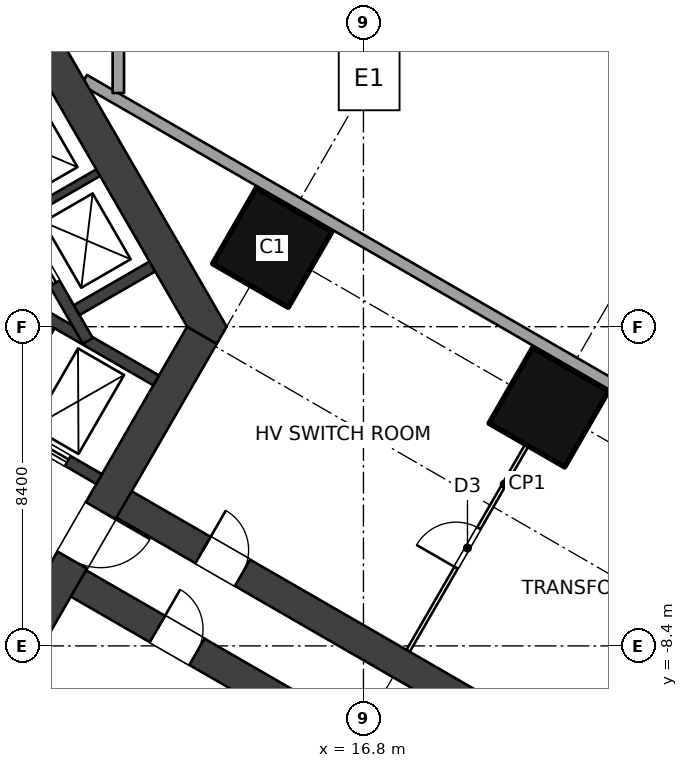
"""IFC4 building model, lengths in metres.
Left out: names, types, materials, properties, quantities, classifications, styles, units other than length and angle.
Written with IfcOpenShell. Run it as: python <this file> out.ifc"""

import sys

from ifc_helpers import new_model, si_unit, direction, frame, frame_2d, origin, origin_2d, place, context, subcontext, project, spatial, polyline, rectangle, outline, extrude, element, fill, save


model = new_model("IFC4")
c1 = context("Model", 3, precision=1e-05, world=origin(), true_north=direction((0.0, 1.0)))
c2 = subcontext(c1, "Body", "Model", "MODEL_VIEW")
j1 = project(units=[si_unit("LENGTHUNIT", "METRE"), si_unit("PLANEANGLEUNIT", "RADIAN")], contexts=[c1])
p1 = place(None, origin())
s1 = spatial("IfcSite", under=j1, at=p1, CompositionType="ELEMENT")
p2 = place(p1, origin())
s2 = spatial("IfcBuilding", under=s1, at=p2, CompositionType="ELEMENT")
p3 = place(p2, origin())
s3 = spatial("IfcBuildingStorey", under=s2, at=p3, CompositionType="ELEMENT", Elevation=0.0)
for number, where, z_axis, x_axis in (
    (1, (14.4, 2.078, 0.0), (0.0, 0.0, 1.0), (-0.5, -0.866, 0.0)),
    (2, (21.675, -2.122, 0.0), (0.0, 0.0, 1.0), (-0.5, -0.866, 0.0)),
):
    element("IfcColumn", number, at=place(p3, frame(where, z_axis=z_axis, x_axis=x_axis)), inside=s3, PredefinedType="COLUMN", context=c2, shape_type="SweptSolid", body=[
        extrude(rectangle(XDim=2.3, YDim=2.3, at=origin_2d()), origin(), (0.0, 0.0, 1.0), 6.0),
    ])
p4 = place(p3, frame((12.551, -0.225, 0.0), z_axis=(0.0, 0.0, 1.0), x_axis=(-0.499997612506, -0.8660267822, 0.0)))
e3 = element("IfcWall", 3, at=p4, inside=s3, PredefinedType="SHEAR", context=c2, shape_type="SweptSolid", body=[
    extrude(rectangle(XDim=12.161, YDim=0.9, at=frame_2d((6.08, 0.0))), origin(), (0.0, 0.0, 1.0), 6.0),
])
p5 = place(p4, frame((5.33, 0.0, 0.0)))
e4 = element("IfcOpeningElement", 4, at=p5, cuts=e3, PredefinedType="OPENING", context=c2, shape_type="SweptSolid", body=[
    extrude(rectangle(XDim=1.5, YDim=2.1, at=frame_2d((0.75, 1.05))), frame((0.0, 0.46, 0.0), z_axis=(0.0, -1.0, 0.0), x_axis=(1.0, 0.0, 0.0)), (0.0, 0.0, 1.0), 0.92),
])
p6 = place(p3, origin())
e5 = element("IfcWall", 5, at=p6, inside=s3, PredefinedType="SHEAR", context=c2, shape_type="SweptSolid", body=[
    extrude(outline(polyline([(13.2, 0.0), (6.6, 11.432), (6.08, 11.432), (6.08, 10.531), (12.161, 0.0), (12.94, -0.45), (13.2, 0.0)])), origin(), (0.0, 0.0, 1.0), 6.0),
])
p7 = place(p3, frame((3.869, -0.559, 0.0), z_axis=(0.0, 0.0, 1.0), x_axis=(0.86602711848, -0.499997030048, 0.0)))
e6 = element("IfcWall", 6, at=p7, inside=s3, PredefinedType="SHEAR", context=c2, shape_type="SweptSolid", body=[
    extrude(rectangle(XDim=6.901, YDim=0.3, at=frame_2d((3.451, 0.0))), origin(), (0.0, 0.0, 1.0), 6.0),
])
p8 = place(p7, frame((4.85, 0.0, 0.0)))
e7 = element("IfcOpeningElement", 7, at=p8, cuts=e6, PredefinedType="OPENING", context=c2, shape_type="SweptSolid", body=[
    extrude(rectangle(XDim=1.1, YDim=2.1, at=frame_2d((0.55, 1.05))), frame((0.0, 0.16, 0.0), z_axis=(0.0, -1.0, 0.0), x_axis=(1.0, 0.0, 0.0)), (0.0, 0.0, 1.0), 0.32),
])
p9 = place(p3, frame((5.369, 2.039, 0.0), z_axis=(0.0, 0.0, 1.0), x_axis=(0.86602711848, -0.499997030048, 0.0)))
e8 = element("IfcWall", 8, at=p9, inside=s3, PredefinedType="SHEAR", context=c2, shape_type="SweptSolid", body=[
    extrude(rectangle(XDim=6.901, YDim=0.3, at=frame_2d((3.451, 0.0))), origin(), (0.0, 0.0, 1.0), 6.0),
])
p10 = place(p3, frame((8.541, 0.034, 0.0), z_axis=(0.0, 0.0, 1.0), x_axis=(-0.50000943426, -0.866019956843, 0.0)))
e9 = element("IfcWall", 9, at=p10, inside=s3, PredefinedType="SHEAR", context=c2, shape_type="SweptSolid", body=[
    extrude(rectangle(XDim=2.7, YDim=0.3, at=frame_2d((1.35, 0.0))), origin(), (0.0, 0.0, 1.0), 6.0),
])
p11 = place(p3, frame((4.45, 8.455, 0.0), z_axis=(0.0, 0.0, 1.0), x_axis=(0.500002290144, -0.866024081565, 0.0)))
e10 = element("IfcWall", 10, at=p11, inside=s3, PredefinedType="SHEAR", context=c2, shape_type="SweptSolid", body=[
    extrude(rectangle(XDim=10.195, YDim=0.3, at=frame_2d((5.098, 0.0))), origin(), (0.0, 0.0, 1.0), 6.0),
])
p12 = place(p11, frame((1.748, 0.0, 0.0)))
e11 = element("IfcOpeningElement", 11, at=p12, cuts=e10, PredefinedType="OPENING", context=c2, shape_type="SweptSolid", body=[
    extrude(rectangle(XDim=1.1, YDim=2.1, at=frame_2d((0.55, 1.05))), frame((0.0, 0.16, 0.0), z_axis=(0.0, -1.0, 0.0), x_axis=(1.0, 0.0, 0.0)), (0.0, 0.0, 1.0), 0.32),
])
p13 = place(p11, frame((4.548, 0.0, 0.0)))
e12 = element("IfcOpeningElement", 12, at=p13, cuts=e10, PredefinedType="OPENING", context=c2, shape_type="SweptSolid", body=[
    extrude(rectangle(XDim=1.1, YDim=2.1, at=frame_2d((0.55, 1.05))), frame((0.0, 0.16, 0.0), z_axis=(0.0, -1.0, 0.0), x_axis=(1.0, 0.0, 0.0)), (0.0, 0.0, 1.0), 0.32),
])
p14 = place(p11, frame((7.348, 0.0, 0.0)))
e13 = element("IfcOpeningElement", 13, at=p14, cuts=e10, PredefinedType="OPENING", context=c2, shape_type="SweptSolid", body=[
    extrude(rectangle(XDim=1.1, YDim=2.1, at=frame_2d((0.55, 1.05))), frame((0.0, 0.16, 0.0), z_axis=(0.0, -1.0, 0.0), x_axis=(1.0, 0.0, 0.0)), (0.0, 0.0, 1.0), 0.32),
])
p15 = place(p3, frame((9.254, 0.435, 0.0), z_axis=(0.0, 0.0, 1.0), x_axis=(0.866007057882, 0.500031774688, 0.0)))
e14 = element("IfcWall", 14, at=p15, inside=s3, PredefinedType="SHEAR", context=c2, shape_type="SweptSolid", body=[
    extrude(rectangle(XDim=2.3, YDim=0.3, at=frame_2d((1.15, 0.0))), origin(), (0.0, 0.0, 1.0), 6.0),
])
p16 = place(p3, frame((7.829, 2.903, 0.0), z_axis=(0.0, 0.0, 1.0), x_axis=(0.866053019151, 0.499952165731, 0.0)))
e15 = element("IfcWall", 15, at=p16, inside=s3, PredefinedType="SHEAR", context=c2, shape_type="SweptSolid", body=[
    extrude(rectangle(XDim=2.3, YDim=0.2, at=frame_2d((1.15, 0.0))), origin(), (0.0, 0.0, 1.0), 6.0),
])
p17 = place(p3, frame((10.11, -4.451, 0.0), z_axis=(0.0, 0.0, 1.0), x_axis=(0.866025284237, -0.500000207062, 0.0)))
e16 = element("IfcWall", 16, at=p17, inside=s3, PredefinedType="SHEAR", context=c2, shape_type="SweptSolid", body=[
    extrude(rectangle(XDim=36.75, YDim=0.8, at=frame_2d((18.375, 0.0))), origin(), (0.0, 0.0, 1.0), 6.0),
])
p18 = place(p17, frame((2.85, 0.0, 0.0)))
e17 = element("IfcOpeningElement", 17, at=p18, cuts=e16, PredefinedType="OPENING", context=c2, shape_type="SweptSolid", body=[
    extrude(rectangle(XDim=1.2, YDim=2.1, at=frame_2d((0.6, 1.05))), frame((0.0, 0.41, 0.0), z_axis=(0.0, -1.0, 0.0), x_axis=(1.0, 0.0, 0.0)), (0.0, 0.0, 1.0), 0.82),
])
p19 = place(p3, frame((8.91, -6.53, 0.0), z_axis=(0.0, 0.0, 1.0), x_axis=(0.866025284237, -0.500000207062, 0.0)))
e18 = element("IfcWall", 18, at=p19, inside=s3, PredefinedType="SHEAR", context=c2, shape_type="SweptSolid", body=[
    extrude(rectangle(XDim=36.75, YDim=0.8, at=frame_2d((18.375, 0.0))), origin(), (0.0, 0.0, 1.0), 6.0),
])
p20 = place(p19, frame((10.0, 0.0, 0.0)))
e19 = element("IfcOpeningElement", 19, at=p20, cuts=e18, PredefinedType="OPENING", context=c2, shape_type="SweptSolid", body=[
    extrude(rectangle(XDim=1.0, YDim=2.1, at=frame_2d((0.5, 1.05))), frame((0.0, 0.41, 0.0), z_axis=(0.0, -1.0, 0.0), x_axis=(1.0, 0.0, 0.0)), (0.0, 0.0, 1.0), 0.82),
])
p21 = place(p19, frame((2.85, 0.0, 0.0)))
e20 = element("IfcOpeningElement", 20, at=p21, cuts=e18, PredefinedType="OPENING", context=c2, shape_type="SweptSolid", body=[
    extrude(rectangle(XDim=1.2, YDim=2.1, at=frame_2d((0.6, 1.05))), frame((0.0, 0.41, 0.0), z_axis=(0.0, -1.0, 0.0), x_axis=(1.0, 0.0, 0.0)), (0.0, 0.0, 1.0), 0.82),
])
p22 = place(p3, frame((17.975, -8.53, 0.0), z_axis=(0.0, 0.0, 1.0), x_axis=(0.500004234368, 0.866022959057, 0.0)))
e21 = element("IfcWall", 21, at=p22, inside=s3, PredefinedType="PARTITIONING", context=c2, shape_type="SweptSolid", body=[
    extrude(rectangle(XDim=6.25, YDim=0.1, at=frame_2d((3.125, 0.0))), origin(), (0.0, 0.0, 1.0), 3.9),
])
p23 = place(p22, frame((2.525, 0.0, 0.0)))
e22 = element("IfcOpeningElement", 22, at=p23, cuts=e21, PredefinedType="OPENING", context=c2, shape_type="SweptSolid", body=[
    extrude(rectangle(XDim=1.2, YDim=2.1, at=frame_2d((0.6, 1.05))), frame((0.0, 0.06, 0.0), z_axis=(0.0, -1.0, 0.0), x_axis=(1.0, 0.0, 0.0)), (0.0, 0.0, 1.0), 0.12),
])
p24 = place(p3, frame((10.35, 6.149, 0.0), z_axis=(0.0, 0.0, 1.0), x_axis=(0.0, 1.0, 0.0)))
e23 = element("IfcWall", 23, at=p24, inside=s3, PredefinedType="SOLIDWALL", context=c2, shape_type="SweptSolid", body=[
    extrude(rectangle(XDim=41.883, YDim=0.3, at=frame_2d((20.941, 0.0))), origin(), (0.0, 0.0, 1.0), 5.7),
])
p25 = place(p24, frame((25.383, 0.0, 0.0)))
e24 = element("IfcOpeningElement", 24, at=p25, cuts=e23, PredefinedType="OPENING", context=c2, shape_type="SweptSolid", body=[
    extrude(rectangle(XDim=1.8, YDim=2.4, at=frame_2d((0.9, 1.2))), frame((0.0, 0.16, 0.0), z_axis=(0.0, -1.0, 0.0), x_axis=(1.0, 0.0, 0.0)), (0.0, 0.0, 1.0), 0.32),
])
p26 = place(p3, frame((9.45, 6.495, 0.0), z_axis=(0.0, 0.0, 1.0), x_axis=(0.866025301493, -0.500000177174, 0.0)))
e25 = element("IfcWall", 25, at=p26, inside=s3, PredefinedType="SOLIDWALL", context=c2, shape_type="SweptSolid", body=[
    extrude(rectangle(XDim=43.095, YDim=0.3, at=frame_2d((21.548, 0.0))), origin(), (0.0, 0.0, 1.0), 5.7),
])
p27 = place(p26, frame((26.595, 0.0, 0.0)))
e26 = element("IfcOpeningElement", 26, at=p27, cuts=e25, PredefinedType="OPENING", context=c2, shape_type="SweptSolid", body=[
    extrude(rectangle(XDim=1.8, YDim=2.4, at=frame_2d((0.9, 1.2))), frame((0.0, 0.16, 0.0), z_axis=(0.0, -1.0, 0.0), x_axis=(1.0, 0.0, 0.0)), (0.0, 0.0, 1.0), 0.32),
])
p28 = place(p14, origin())
e27 = element("IfcDoor", 27, at=p28, inside=s3, OperationType="DOUBLE_DOOR_SLIDING", PredefinedType="DOOR", context=c2, shape_type="SweptSolid", body=[
    extrude(rectangle(XDim=1.1, YDim=2.1, at=frame_2d((0.55, 1.05))), frame((0.0, 0.025, 0.0), z_axis=(0.0, -1.0, 0.0), x_axis=(1.0, 0.0, 0.0)), (0.0, 0.0, 1.0), 0.05),
])
fill(e13, e27)
p29 = place(p8, origin())
e28 = element("IfcDoor", 28, at=p29, inside=s3, OperationType="DOUBLE_DOOR_SLIDING", PredefinedType="DOOR", context=c2, shape_type="SweptSolid", body=[
    extrude(rectangle(XDim=1.1, YDim=2.1, at=frame_2d((0.55, 1.05))), frame((0.0, 0.025, 0.0), z_axis=(0.0, -1.0, 0.0), x_axis=(1.0, 0.0, 0.0)), (0.0, 0.0, 1.0), 0.05),
])
fill(e7, e28)
p30 = place(p5, origin())
e29 = element("IfcDoor", 29, at=p30, inside=s3, OperationType="DOUBLE_DOOR_DOUBLE_SWING", PredefinedType="DOOR", context=c2, shape_type="SweptSolid", body=[
    extrude(rectangle(XDim=1.5, YDim=2.1, at=frame_2d((0.75, 1.05))), frame((0.0, 0.025, 0.0), z_axis=(0.0, -1.0, 0.0), x_axis=(1.0, 0.0, 0.0)), (0.0, 0.0, 1.0), 0.05),
])
fill(e4, e29)
p31 = place(p23, origin())
e30 = element("IfcDoor", 30, at=p31, inside=s3, OperationType="DOUBLE_SWING_LEFT", PredefinedType="DOOR", context=c2, shape_type="SweptSolid", body=[
    extrude(rectangle(XDim=1.2, YDim=2.1, at=frame_2d((0.6, 1.05))), frame((0.0, 0.025, 0.0), z_axis=(0.0, -1.0, 0.0), x_axis=(1.0, 0.0, 0.0)), (0.0, 0.0, 1.0), 0.05),
])
fill(e22, e30)
p32 = place(p18, origin())
e31 = element("IfcDoor", 31, at=p32, inside=s3, OperationType="DOUBLE_SWING_LEFT", PredefinedType="DOOR", context=c2, shape_type="SweptSolid", body=[
    extrude(rectangle(XDim=1.2, YDim=2.1, at=frame_2d((0.6, 1.05))), frame((0.0, 0.025, 0.0), z_axis=(0.0, -1.0, 0.0), x_axis=(1.0, 0.0, 0.0)), (0.0, 0.0, 1.0), 0.05),
])
fill(e17, e31)
p33 = place(p21, origin())
e32 = element("IfcDoor", 32, at=p33, inside=s3, OperationType="DOUBLE_SWING_LEFT", PredefinedType="DOOR", context=c2, shape_type="SweptSolid", body=[
    extrude(rectangle(XDim=1.2, YDim=2.1, at=frame_2d((0.6, 1.05))), frame((0.0, 0.025, 0.0), z_axis=(0.0, -1.0, 0.0), x_axis=(1.0, 0.0, 0.0)), (0.0, 0.0, 1.0), 0.05),
])
fill(e20, e32)
save(model, sys.argv[1])
